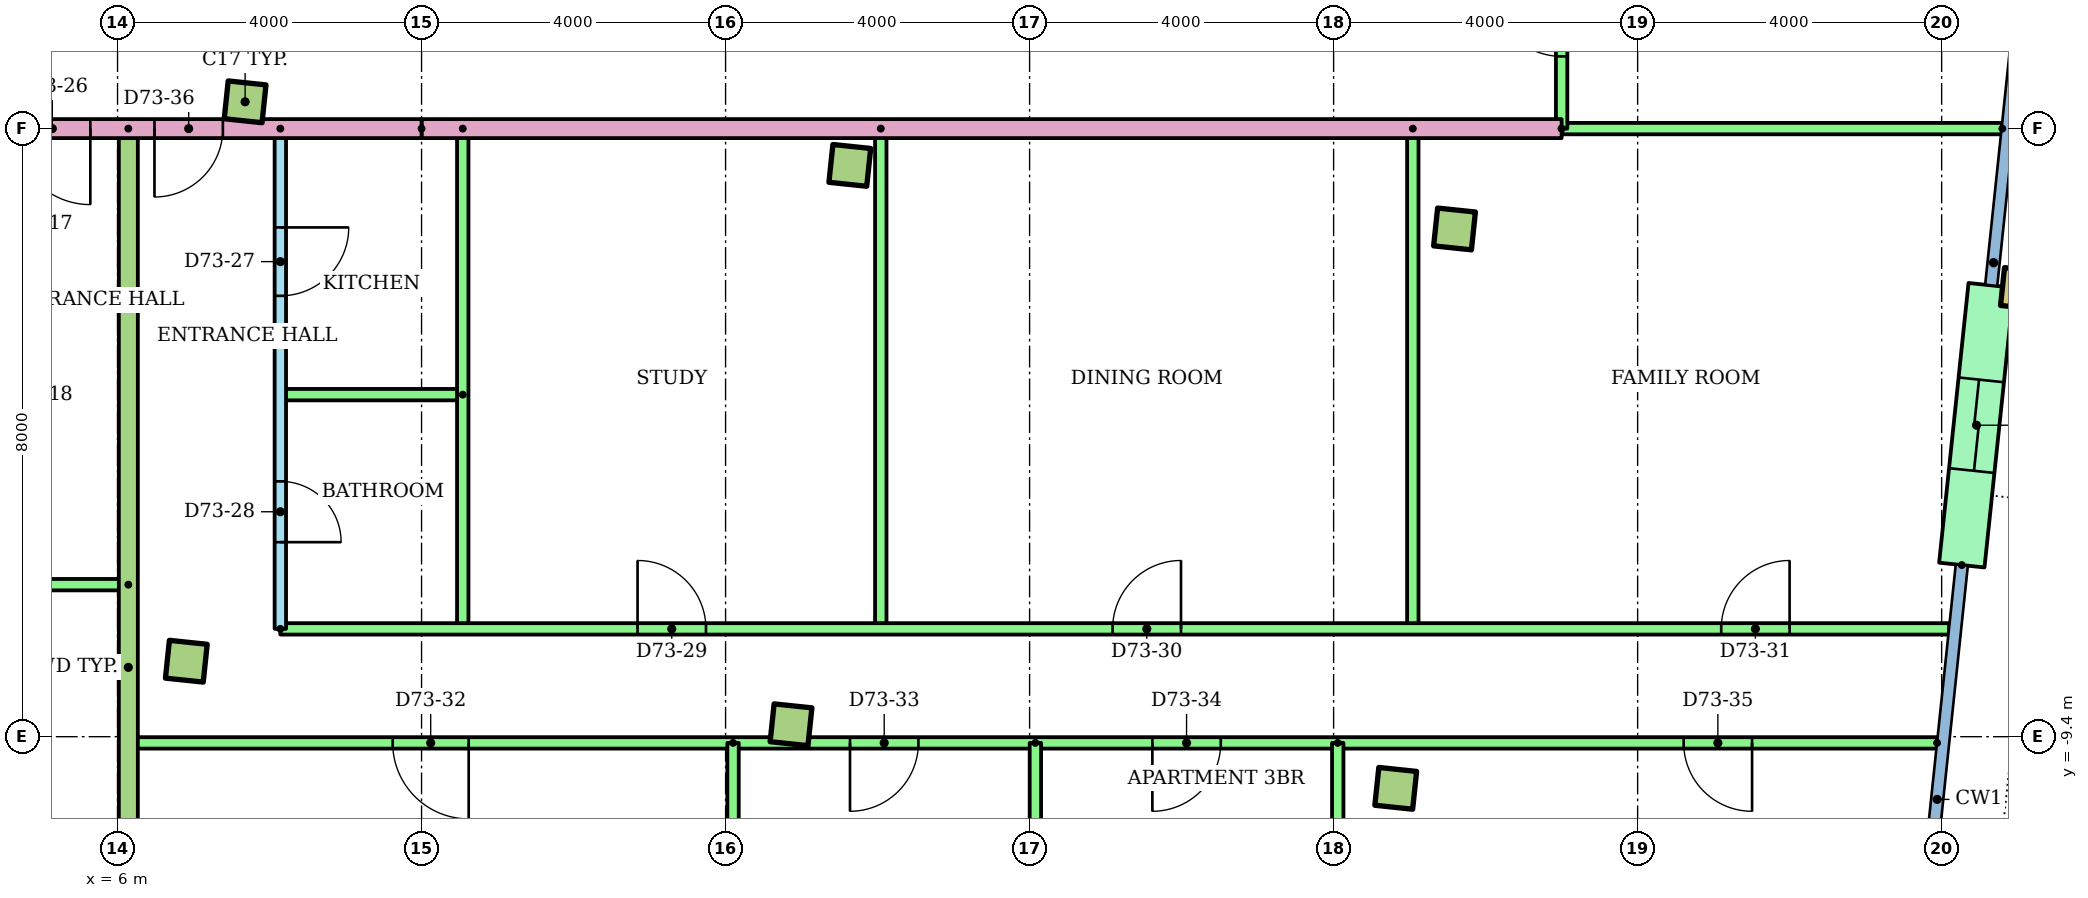
"""IFC4 building model, lengths in metres.
Left out: names, types, materials, properties, quantities, classifications, styles, units other than length and angle.
Written with IfcOpenShell. Run it as: python <this file> out.ifc"""

import sys

from ifc_helpers import new_model, si_unit, direction, frame, frame_2d, origin, origin_2d, place, context, subcontext, project, spatial, rectangle, hollow_rectangle, extrude, element, fill, save


model = new_model("IFC4")
c1 = context("Model", 3, precision=1e-05, world=origin(), true_north=direction((0.0, 1.0)))
c2 = subcontext(c1, "Body", "Model", "MODEL_VIEW")
j1 = project(units=[si_unit("LENGTHUNIT", "METRE"), si_unit("PLANEANGLEUNIT", "RADIAN")], contexts=[c1])
p1 = place(None, origin())
s1 = spatial("IfcSite", under=j1, at=p1, CompositionType="ELEMENT")
p2 = place(p1, origin())
s2 = spatial("IfcBuilding", under=s1, at=p2, CompositionType="ELEMENT")
p3 = place(p2, frame((0.0, 0.0, 278.7)))
s3 = spatial("IfcBuildingStorey", under=s2, at=p3, CompositionType="ELEMENT", Elevation=278.7)
for number, where, z_axis, x_axis in (
    (1, (6.905, -8.407, 0.0), (0.0, 0.0, 1.0), (0.995, -0.105, 0.0)),
    (2, (14.861, -9.243, 0.0), (0.0, 0.0, 1.0), (0.995, -0.105, 0.0)),
    (3, (22.817, -10.08, 0.0), (0.0, 0.0, 1.0), (0.995, -0.105, 0.0)),
    (4, (7.678, -1.048, 0.0), (0.0, 0.0, 1.0), (0.995, -0.105, 0.0)),
    (5, (15.635, -1.884, 0.0), (0.0, 0.0, 1.0), (0.995, -0.105, 0.0)),
    (6, (23.591, -2.72, 0.0), (0.0, 0.0, 1.0), (0.995, -0.105, 0.0)),
):
    element("IfcColumn", number, at=place(p3, frame(where, z_axis=z_axis, x_axis=x_axis)), inside=s3, PredefinedType="COLUMN", context=c2, shape_type="SweptSolid", body=[
        extrude(rectangle(XDim=0.5, YDim=0.5, at=origin_2d()), origin(), (0.0, 0.0, 1.0), 3.2),
    ])
p4 = place(p3, frame((31.05, -3.504, 0.0), z_axis=(0.0, 0.0, 1.0), x_axis=(0.994521895368, -0.104528463268, 0.0)))
e7 = element("IfcColumn", 7, at=p4, inside=s3, PredefinedType="COLUMN", context=c2, shape_type="SweptSolid", body=[
    extrude(hollow_rectangle(XDim=0.5, YDim=0.5, WallThickness=0.025, at=origin_2d()), origin(), (0.0, 0.0, 1.0), 3.2),
])
p5 = place(p3, frame((30.265, -7.142, 0.0), z_axis=(0.0, 0.0, 1.0), x_axis=(0.104513052986, 0.994523514933, 0.0)))
e8 = element("IfcWall", 8, at=p5, inside=s3, PredefinedType="STANDARD", context=c2, shape_type="SweptSolid", body=[
    extrude(rectangle(XDim=3.7, YDim=0.6, at=frame_2d((1.85, 0.0))), origin(), (0.0, 0.0, 1.0), 2.8),
])
p6 = place(p5, frame((1.25, 0.0, 0.0)))
e9 = element("IfcOpeningElement", 9, at=p6, cuts=e8, PredefinedType="OPENING", context=c2, shape_type="SweptSolid", body=[
    extrude(rectangle(XDim=1.2, YDim=2.1, at=frame_2d((0.6, 1.05))), frame((0.0, 0.31, 0.0), z_axis=(0.0, -1.0, 0.0), x_axis=(1.0, 0.0, 0.0)), (0.0, 0.0, 1.0), 0.62),
])
p7 = place(p3, frame((6.142, -7.4, 0.0), z_axis=(0.0, 0.0, 1.0), x_axis=(-1.0, 0.0, 0.0)))
e10 = element("IfcWall", 10, at=p7, inside=s3, PredefinedType="PARTITIONING", context=c2, shape_type="SweptSolid", body=[
    extrude(rectangle(XDim=15.912, YDim=0.15, at=frame_2d((7.956, 0.0))), origin(), (0.0, 0.0, 1.0), 2.4),
])
p8 = place(p7, frame((12.252, 0.0, 0.0)))
e11 = element("IfcOpeningElement", 11, at=p8, cuts=e10, PredefinedType="OPENING", context=c2, shape_type="SweptSolid", body=[
    extrude(rectangle(XDim=0.9, YDim=2.1, at=frame_2d((0.45, 1.05))), frame((0.0, 0.085, 0.0), z_axis=(0.0, -1.0, 0.0), x_axis=(1.0, 0.0, 0.0)), (0.0, 0.0, 1.0), 0.17),
])
p9 = place(p7, frame((9.495, 0.0, 0.0)))
e12 = element("IfcOpeningElement", 12, at=p9, cuts=e10, PredefinedType="OPENING", context=c2, shape_type="SweptSolid", body=[
    extrude(rectangle(XDim=0.9, YDim=2.1, at=frame_2d((0.45, 1.05))), frame((0.0, 0.085, 0.0), z_axis=(0.0, -1.0, 0.0), x_axis=(1.0, 0.0, 0.0)), (0.0, 0.0, 1.0), 0.17),
])
p10 = place(p7, frame((3.478, 0.0, 0.0)))
e13 = element("IfcOpeningElement", 13, at=p10, cuts=e10, PredefinedType="OPENING", context=c2, shape_type="SweptSolid", body=[
    extrude(rectangle(XDim=1.0, YDim=2.1, at=frame_2d((0.5, 1.05))), frame((0.0, 0.085, 0.0), z_axis=(0.0, -1.0, 0.0), x_axis=(1.0, 0.0, 0.0)), (0.0, 0.0, 1.0), 0.17),
])
p11 = place(p3, frame((8.142, -1.4, 0.0), z_axis=(0.0, 0.0, 1.0), x_axis=(0.0, -1.0, 0.0)))
e14 = element("IfcWall", 14, at=p11, inside=s3, PredefinedType="PARTITIONING", context=c2, shape_type="SweptSolid", body=[
    extrude(rectangle(XDim=6.582, YDim=0.15, at=frame_2d((3.291, 0.0))), origin(), (0.0, 0.0, 1.0), 2.4),
])
p12 = place(p11, frame((1.3, 0.0, 0.0)))
e15 = element("IfcOpeningElement", 15, at=p12, cuts=e14, PredefinedType="OPENING", context=c2, shape_type="SweptSolid", body=[
    extrude(rectangle(XDim=0.9, YDim=2.1, at=frame_2d((0.45, 1.05))), frame((0.0, 0.085, 0.0), z_axis=(0.0, -1.0, 0.0), x_axis=(1.0, 0.0, 0.0)), (0.0, 0.0, 1.0), 0.17),
])
p13 = place(p11, frame((4.641, 0.0, 0.0)))
e16 = element("IfcOpeningElement", 16, at=p13, cuts=e14, PredefinedType="OPENING", context=c2, shape_type="SweptSolid", body=[
    extrude(rectangle(XDim=0.8, YDim=2.1, at=frame_2d((0.4, 1.05))), frame((0.0, 0.085, 0.0), z_axis=(0.0, -1.0, 0.0), x_axis=(1.0, 0.0, 0.0)), (0.0, 0.0, 1.0), 0.17),
])
p14 = place(p3, frame((10.542, -4.9, 0.0), z_axis=(0.0, 0.0, 1.0), x_axis=(-1.0, 0.0, 0.0)))
e17 = element("IfcWall", 17, at=p14, inside=s3, PredefinedType="PARTITIONING", context=c2, shape_type="SweptSolid", body=[
    extrude(rectangle(XDim=2.4, YDim=0.15, at=frame_2d((1.2, 0.0))), origin(), (0.0, 0.0, 1.0), 2.4),
])
for number, where, z_axis, x_axis in (
    (18, (10.542, -1.4, 0.0), (0.0, 0.0, 1.0), (0.0, -1.0, 0.0)),
    (19, (16.042, -1.4, 0.0), (0.0, 0.0, 1.0), (0.0, -1.0, 0.0)),
    (20, (23.042, -1.4, 0.0), (0.0, 0.0, 1.0), (0.0, -1.0, 0.0)),
):
    element("IfcWall", number, at=place(p3, frame(where, z_axis=z_axis, x_axis=x_axis)), inside=s3, PredefinedType="PARTITIONING", context=c2, shape_type="SweptSolid", body=[
        extrude(rectangle(XDim=6.582, YDim=0.15, at=frame_2d((3.291, 0.0))), origin(), (0.0, 0.0, 1.0), 2.4),
    ])
p15 = place(p3, frame((8.142, -7.982, 0.0)))
e21 = element("IfcWall", 21, at=p15, inside=s3, PredefinedType="PARTITIONING", context=c2, shape_type="SweptSolid", body=[
    extrude(rectangle(XDim=21.955, YDim=0.15, at=frame_2d((10.978, 0.0))), origin(), (0.0, 0.0, 1.0), 2.4),
])
p16 = place(p15, frame((4.7, 0.0, 0.0)))
e22 = element("IfcOpeningElement", 22, at=p16, cuts=e21, PredefinedType="OPENING", context=c2, shape_type="SweptSolid", body=[
    extrude(rectangle(XDim=0.9, YDim=2.1, at=frame_2d((0.45, 1.05))), frame((0.0, 0.085, 0.0), z_axis=(0.0, -1.0, 0.0), x_axis=(1.0, 0.0, 0.0)), (0.0, 0.0, 1.0), 0.17),
])
p17 = place(p15, frame((10.95, 0.0, 0.0)))
e23 = element("IfcOpeningElement", 23, at=p17, cuts=e21, PredefinedType="OPENING", context=c2, shape_type="SweptSolid", body=[
    extrude(rectangle(XDim=0.9, YDim=2.1, at=frame_2d((0.45, 1.05))), frame((0.0, 0.085, 0.0), z_axis=(0.0, -1.0, 0.0), x_axis=(1.0, 0.0, 0.0)), (0.0, 0.0, 1.0), 0.17),
])
p18 = place(p15, frame((18.958, 0.0, 0.0)))
e24 = element("IfcOpeningElement", 24, at=p18, cuts=e21, PredefinedType="OPENING", context=c2, shape_type="SweptSolid", body=[
    extrude(rectangle(XDim=0.9, YDim=2.1, at=frame_2d((0.45, 1.05))), frame((0.0, 0.085, 0.0), z_axis=(0.0, -1.0, 0.0), x_axis=(1.0, 0.0, 0.0)), (0.0, 0.0, 1.0), 0.17),
])
p19 = place(p3, frame((29.94, -9.482, 0.0), z_axis=(0.0, 0.0, 1.0), x_axis=(-1.0, 0.0, 0.0)))
e25 = element("IfcWall", 25, at=p19, inside=s3, PredefinedType="PARTITIONING", context=c2, shape_type="SweptSolid", body=[
    extrude(rectangle(XDim=23.798, YDim=0.15, at=frame_2d((11.899, 0.0))), origin(), (0.0, 0.0, 1.0), 2.4),
])
p20 = place(p19, frame((19.32, 0.0, 0.0)))
e26 = element("IfcOpeningElement", 26, at=p20, cuts=e25, PredefinedType="OPENING", context=c2, shape_type="SweptSolid", body=[
    extrude(rectangle(XDim=1.0, YDim=2.1, at=frame_2d((0.5, 1.05))), frame((0.0, 0.085, 0.0), z_axis=(0.0, -1.0, 0.0), x_axis=(1.0, 0.0, 0.0)), (0.0, 0.0, 1.0), 0.17),
])
p21 = place(p19, frame((13.403, 0.0, 0.0)))
e27 = element("IfcOpeningElement", 27, at=p21, cuts=e25, PredefinedType="OPENING", context=c2, shape_type="SweptSolid", body=[
    extrude(rectangle(XDim=0.9, YDim=2.1, at=frame_2d((0.45, 1.05))), frame((0.0, 0.085, 0.0), z_axis=(0.0, -1.0, 0.0), x_axis=(1.0, 0.0, 0.0)), (0.0, 0.0, 1.0), 0.17),
])
p22 = place(p19, frame((9.425, 0.0, 0.0)))
e28 = element("IfcOpeningElement", 28, at=p22, cuts=e25, PredefinedType="OPENING", context=c2, shape_type="SweptSolid", body=[
    extrude(rectangle(XDim=0.9, YDim=2.1, at=frame_2d((0.45, 1.05))), frame((0.0, 0.085, 0.0), z_axis=(0.0, -1.0, 0.0), x_axis=(1.0, 0.0, 0.0)), (0.0, 0.0, 1.0), 0.17),
])
p23 = place(p19, frame((2.434, 0.0, 0.0)))
e29 = element("IfcOpeningElement", 29, at=p23, cuts=e25, PredefinedType="OPENING", context=c2, shape_type="SweptSolid", body=[
    extrude(rectangle(XDim=0.9, YDim=2.1, at=frame_2d((0.45, 1.05))), frame((0.0, 0.085, 0.0), z_axis=(0.0, -1.0, 0.0), x_axis=(1.0, 0.0, 0.0)), (0.0, 0.0, 1.0), 0.17),
])
p24 = place(p3, frame((14.098, -9.482, 0.0), z_axis=(0.0, 0.0, 1.0), x_axis=(0.0, -1.0, 0.0)))
e30 = element("IfcWall", 30, at=p24, inside=s3, PredefinedType="PARTITIONING", context=c2, shape_type="SweptSolid", body=[
    extrude(rectangle(XDim=6.931, YDim=0.15, at=frame_2d((3.466, 0.0))), origin(), (0.0, 0.0, 1.0), 2.4),
])
p25 = place(p3, frame((18.076, -9.482, 0.0), z_axis=(0.0, 0.0, 1.0), x_axis=(0.0, -1.0, 0.0)))
e31 = element("IfcWall", 31, at=p25, inside=s3, PredefinedType="PARTITIONING", context=c2, shape_type="SweptSolid", body=[
    extrude(rectangle(XDim=7.36, YDim=0.15, at=frame_2d((3.68, 0.0))), origin(), (0.0, 0.0, 1.0), 2.4),
])
p26 = place(p3, frame((22.054, -9.482, 0.0), z_axis=(0.0, 0.0, 1.0), x_axis=(0.0, -1.0, 0.0)))
e32 = element("IfcWall", 32, at=p26, inside=s3, PredefinedType="PARTITIONING", context=c2, shape_type="SweptSolid", body=[
    extrude(rectangle(XDim=7.767, YDim=0.15, at=frame_2d((3.884, 0.0))), origin(), (0.0, 0.0, 1.0), 2.4),
])
p27 = place(p3, frame((6.142, -1.4, 0.0), z_axis=(0.0, 0.0, 1.0), x_axis=(0.0, -1.0, 0.0)))
e33 = element("IfcWall", 33, at=p27, inside=s3, PredefinedType="PARTITIONING", context=c2, shape_type="SweptSolid", body=[
    extrude(rectangle(XDim=14.177, YDim=0.25, at=frame_2d((7.088, 0.0))), origin(), (0.0, 0.0, 1.0), 2.4),
])
p28 = place(p3, frame((25.0, -1.4, 0.0), z_axis=(0.0, 0.0, 1.0), x_axis=(-1.0, 0.0, 0.0)))
e34 = element("IfcWall", 34, at=p28, inside=s3, PredefinedType="PARTITIONING", context=c2, shape_type="SweptSolid", body=[
    extrude(rectangle(XDim=15.0, YDim=0.25, at=frame_2d((7.5, 0.0))), origin(), (0.0, 0.0, 1.0), 2.4),
])
p29 = place(p3, frame((30.798, -1.4, 0.0), z_axis=(0.0, 0.0, 1.0), x_axis=(-1.0, 0.0, 0.0)))
e35 = element("IfcWall", 35, at=p29, inside=s3, PredefinedType="PARTITIONING", context=c2, shape_type="SweptSolid", body=[
    extrude(rectangle(XDim=5.798, YDim=0.15, at=frame_2d((2.899, 0.0))), origin(), (0.0, 0.0, 1.0), 2.4),
])
p30 = place(p3, frame((25.0, -1.4, 0.0), z_axis=(0.0, 0.0, 1.0), x_axis=(0.0, 1.0, 0.0)))
e36 = element("IfcWall", 36, at=p30, inside=s3, PredefinedType="PARTITIONING", context=c2, shape_type="SweptSolid", body=[
    extrude(rectangle(XDim=2.8, YDim=0.15, at=frame_2d((1.4, 0.0))), origin(), (0.0, 0.0, 1.0), 2.4),
])
p31 = place(p30, frame((0.95, 0.0, 0.0)))
e37 = element("IfcOpeningElement", 37, at=p31, cuts=e36, PredefinedType="OPENING", context=c2, shape_type="SweptSolid", body=[
    extrude(rectangle(XDim=0.9, YDim=2.1, at=frame_2d((0.45, 1.05))), frame((0.0, 0.085, 0.0), z_axis=(0.0, -1.0, 0.0), x_axis=(1.0, 0.0, 0.0)), (0.0, 0.0, 1.0), 0.17),
])
p32 = place(p3, frame((10.0, -1.4, 0.0), z_axis=(0.0, 0.0, 1.0), x_axis=(-1.0, 0.0, 0.0)))
e38 = element("IfcWall", 38, at=p32, inside=s3, PredefinedType="PARTITIONING", context=c2, shape_type="SweptSolid", body=[
    extrude(rectangle(XDim=20.0, YDim=0.25, at=frame_2d((10.0, 0.0))), origin(), (0.0, 0.0, 1.0), 2.4),
])
p33 = place(p32, frame((4.358, 0.0, 0.0)))
e39 = element("IfcOpeningElement", 39, at=p33, cuts=e38, PredefinedType="OPENING", context=c2, shape_type="SweptSolid", body=[
    extrude(rectangle(XDim=1.0, YDim=2.1, at=frame_2d((0.5, 1.05))), frame((0.0, 0.135, 0.0), z_axis=(0.0, -1.0, 0.0), x_axis=(1.0, 0.0, 0.0)), (0.0, 0.0, 1.0), 0.27),
])
p34 = place(p32, frame((2.614, 0.0, 0.0)))
e40 = element("IfcOpeningElement", 40, at=p34, cuts=e38, PredefinedType="OPENING", context=c2, shape_type="SweptSolid", body=[
    extrude(rectangle(XDim=0.9, YDim=2.1, at=frame_2d((0.45, 1.05))), frame((0.0, 0.135, 0.0), z_axis=(0.0, -1.0, 0.0), x_axis=(1.0, 0.0, 0.0)), (0.0, 0.0, 1.0), 0.27),
])
p35 = place(p33, origin())
e41 = element("IfcDoor", 41, at=p35, inside=s3, OperationType="SINGLE_SWING_LEFT", PredefinedType="DOOR", context=c2, shape_type="SweptSolid", body=[
    extrude(rectangle(XDim=1.0, YDim=2.1, at=frame_2d((0.5, 1.05))), frame((0.0, 0.025, 0.0), z_axis=(0.0, -1.0, 0.0), x_axis=(1.0, 0.0, 0.0)), (0.0, 0.0, 1.0), 0.05),
])
fill(e39, e41)
p36 = place(p12, origin())
e42 = element("IfcDoor", 42, at=p36, inside=s3, OperationType="SINGLE_SWING_LEFT", PredefinedType="DOOR", context=c2, shape_type="SweptSolid", body=[
    extrude(rectangle(XDim=0.9, YDim=2.1, at=frame_2d((0.45, 1.05))), frame((0.0, 0.025, 0.0), z_axis=(0.0, -1.0, 0.0), x_axis=(1.0, 0.0, 0.0)), (0.0, 0.0, 1.0), 0.05),
])
fill(e15, e42)
p37 = place(p13, origin())
e43 = element("IfcDoor", 43, at=p37, inside=s3, OperationType="SINGLE_SWING_RIGHT", PredefinedType="DOOR", context=c2, shape_type="SweptSolid", body=[
    extrude(rectangle(XDim=0.8, YDim=2.1, at=frame_2d((0.4, 1.05))), frame((0.0, 0.025, 0.0), z_axis=(0.0, -1.0, 0.0), x_axis=(1.0, 0.0, 0.0)), (0.0, 0.0, 1.0), 0.05),
])
fill(e16, e43)
p38 = place(p16, origin())
e44 = element("IfcDoor", 44, at=p38, inside=s3, OperationType="SINGLE_SWING_LEFT", PredefinedType="DOOR", context=c2, shape_type="SweptSolid", body=[
    extrude(rectangle(XDim=0.9, YDim=2.1, at=frame_2d((0.45, 1.05))), frame((0.0, 0.025, 0.0), z_axis=(0.0, -1.0, 0.0), x_axis=(1.0, 0.0, 0.0)), (0.0, 0.0, 1.0), 0.05),
])
fill(e22, e44)
p39 = place(p17, origin())
e45 = element("IfcDoor", 45, at=p39, inside=s3, OperationType="SINGLE_SWING_RIGHT", PredefinedType="DOOR", context=c2, shape_type="SweptSolid", body=[
    extrude(rectangle(XDim=0.9, YDim=2.1, at=frame_2d((0.45, 1.05))), frame((0.0, 0.025, 0.0), z_axis=(0.0, -1.0, 0.0), x_axis=(1.0, 0.0, 0.0)), (0.0, 0.0, 1.0), 0.05),
])
fill(e23, e45)
p40 = place(p18, origin())
e46 = element("IfcDoor", 46, at=p40, inside=s3, OperationType="SINGLE_SWING_RIGHT", PredefinedType="DOOR", context=c2, shape_type="SweptSolid", body=[
    extrude(rectangle(XDim=0.9, YDim=2.1, at=frame_2d((0.45, 1.05))), frame((0.0, 0.025, 0.0), z_axis=(0.0, -1.0, 0.0), x_axis=(1.0, 0.0, 0.0)), (0.0, 0.0, 1.0), 0.05),
])
fill(e24, e46)
p41 = place(p20, origin())
e47 = element("IfcDoor", 47, at=p41, inside=s3, OperationType="SINGLE_SWING_LEFT", PredefinedType="DOOR", context=c2, shape_type="SweptSolid", body=[
    extrude(rectangle(XDim=1.0, YDim=2.1, at=frame_2d((0.5, 1.05))), frame((0.0, 0.025, 0.0), z_axis=(0.0, -1.0, 0.0), x_axis=(1.0, 0.0, 0.0)), (0.0, 0.0, 1.0), 0.05),
])
fill(e26, e47)
p42 = place(p21, origin())
e48 = element("IfcDoor", 48, at=p42, inside=s3, OperationType="SINGLE_SWING_RIGHT", PredefinedType="DOOR", context=c2, shape_type="SweptSolid", body=[
    extrude(rectangle(XDim=0.9, YDim=2.1, at=frame_2d((0.45, 1.05))), frame((0.0, 0.025, 0.0), z_axis=(0.0, -1.0, 0.0), x_axis=(1.0, 0.0, 0.0)), (0.0, 0.0, 1.0), 0.05),
])
fill(e27, e48)
p43 = place(p22, origin())
e49 = element("IfcDoor", 49, at=p43, inside=s3, OperationType="SINGLE_SWING_RIGHT", PredefinedType="DOOR", context=c2, shape_type="SweptSolid", body=[
    extrude(rectangle(XDim=0.9, YDim=2.1, at=frame_2d((0.45, 1.05))), frame((0.0, 0.025, 0.0), z_axis=(0.0, -1.0, 0.0), x_axis=(1.0, 0.0, 0.0)), (0.0, 0.0, 1.0), 0.05),
])
fill(e28, e49)
p44 = place(p23, origin())
e50 = element("IfcDoor", 50, at=p44, inside=s3, OperationType="SINGLE_SWING_LEFT", PredefinedType="DOOR", context=c2, shape_type="SweptSolid", body=[
    extrude(rectangle(XDim=0.9, YDim=2.1, at=frame_2d((0.45, 1.05))), frame((0.0, 0.025, 0.0), z_axis=(0.0, -1.0, 0.0), x_axis=(1.0, 0.0, 0.0)), (0.0, 0.0, 1.0), 0.05),
])
fill(e29, e50)
p45 = place(p34, origin())
e51 = element("IfcDoor", 51, at=p45, inside=s3, OperationType="SINGLE_SWING_RIGHT", PredefinedType="DOOR", context=c2, shape_type="SweptSolid", body=[
    extrude(rectangle(XDim=0.9, YDim=2.1, at=frame_2d((0.45, 1.05))), frame((0.0, 0.025, 0.0), z_axis=(0.0, -1.0, 0.0), x_axis=(1.0, 0.0, 0.0)), (0.0, 0.0, 1.0), 0.05),
])
fill(e40, e51)
p46 = place(p31, origin())
e52 = element("IfcDoor", 52, at=p46, inside=s3, OperationType="SINGLE_SWING_RIGHT", PredefinedType="DOOR", context=c2, shape_type="SweptSolid", body=[
    extrude(rectangle(XDim=0.9, YDim=2.1, at=frame_2d((0.45, 1.05))), frame((0.0, 0.025, 0.0), z_axis=(0.0, -1.0, 0.0), x_axis=(1.0, 0.0, 0.0)), (0.0, 0.0, 1.0), 0.05),
])
fill(e37, e52)
p47 = place(p6, origin())
e53 = element("IfcDoor", 53, at=p47, inside=s3, OperationType="SLIDING_TO_LEFT", PredefinedType="DOOR", context=c2, shape_type="SweptSolid", body=[
    extrude(rectangle(XDim=1.2, YDim=2.1, at=frame_2d((0.6, 1.05))), frame((0.0, 0.025, 0.0), z_axis=(0.0, -1.0, 0.0), x_axis=(1.0, 0.0, 0.0)), (0.0, 0.0, 1.0), 0.05),
])
fill(e9, e53)
save(model, sys.argv[1])
